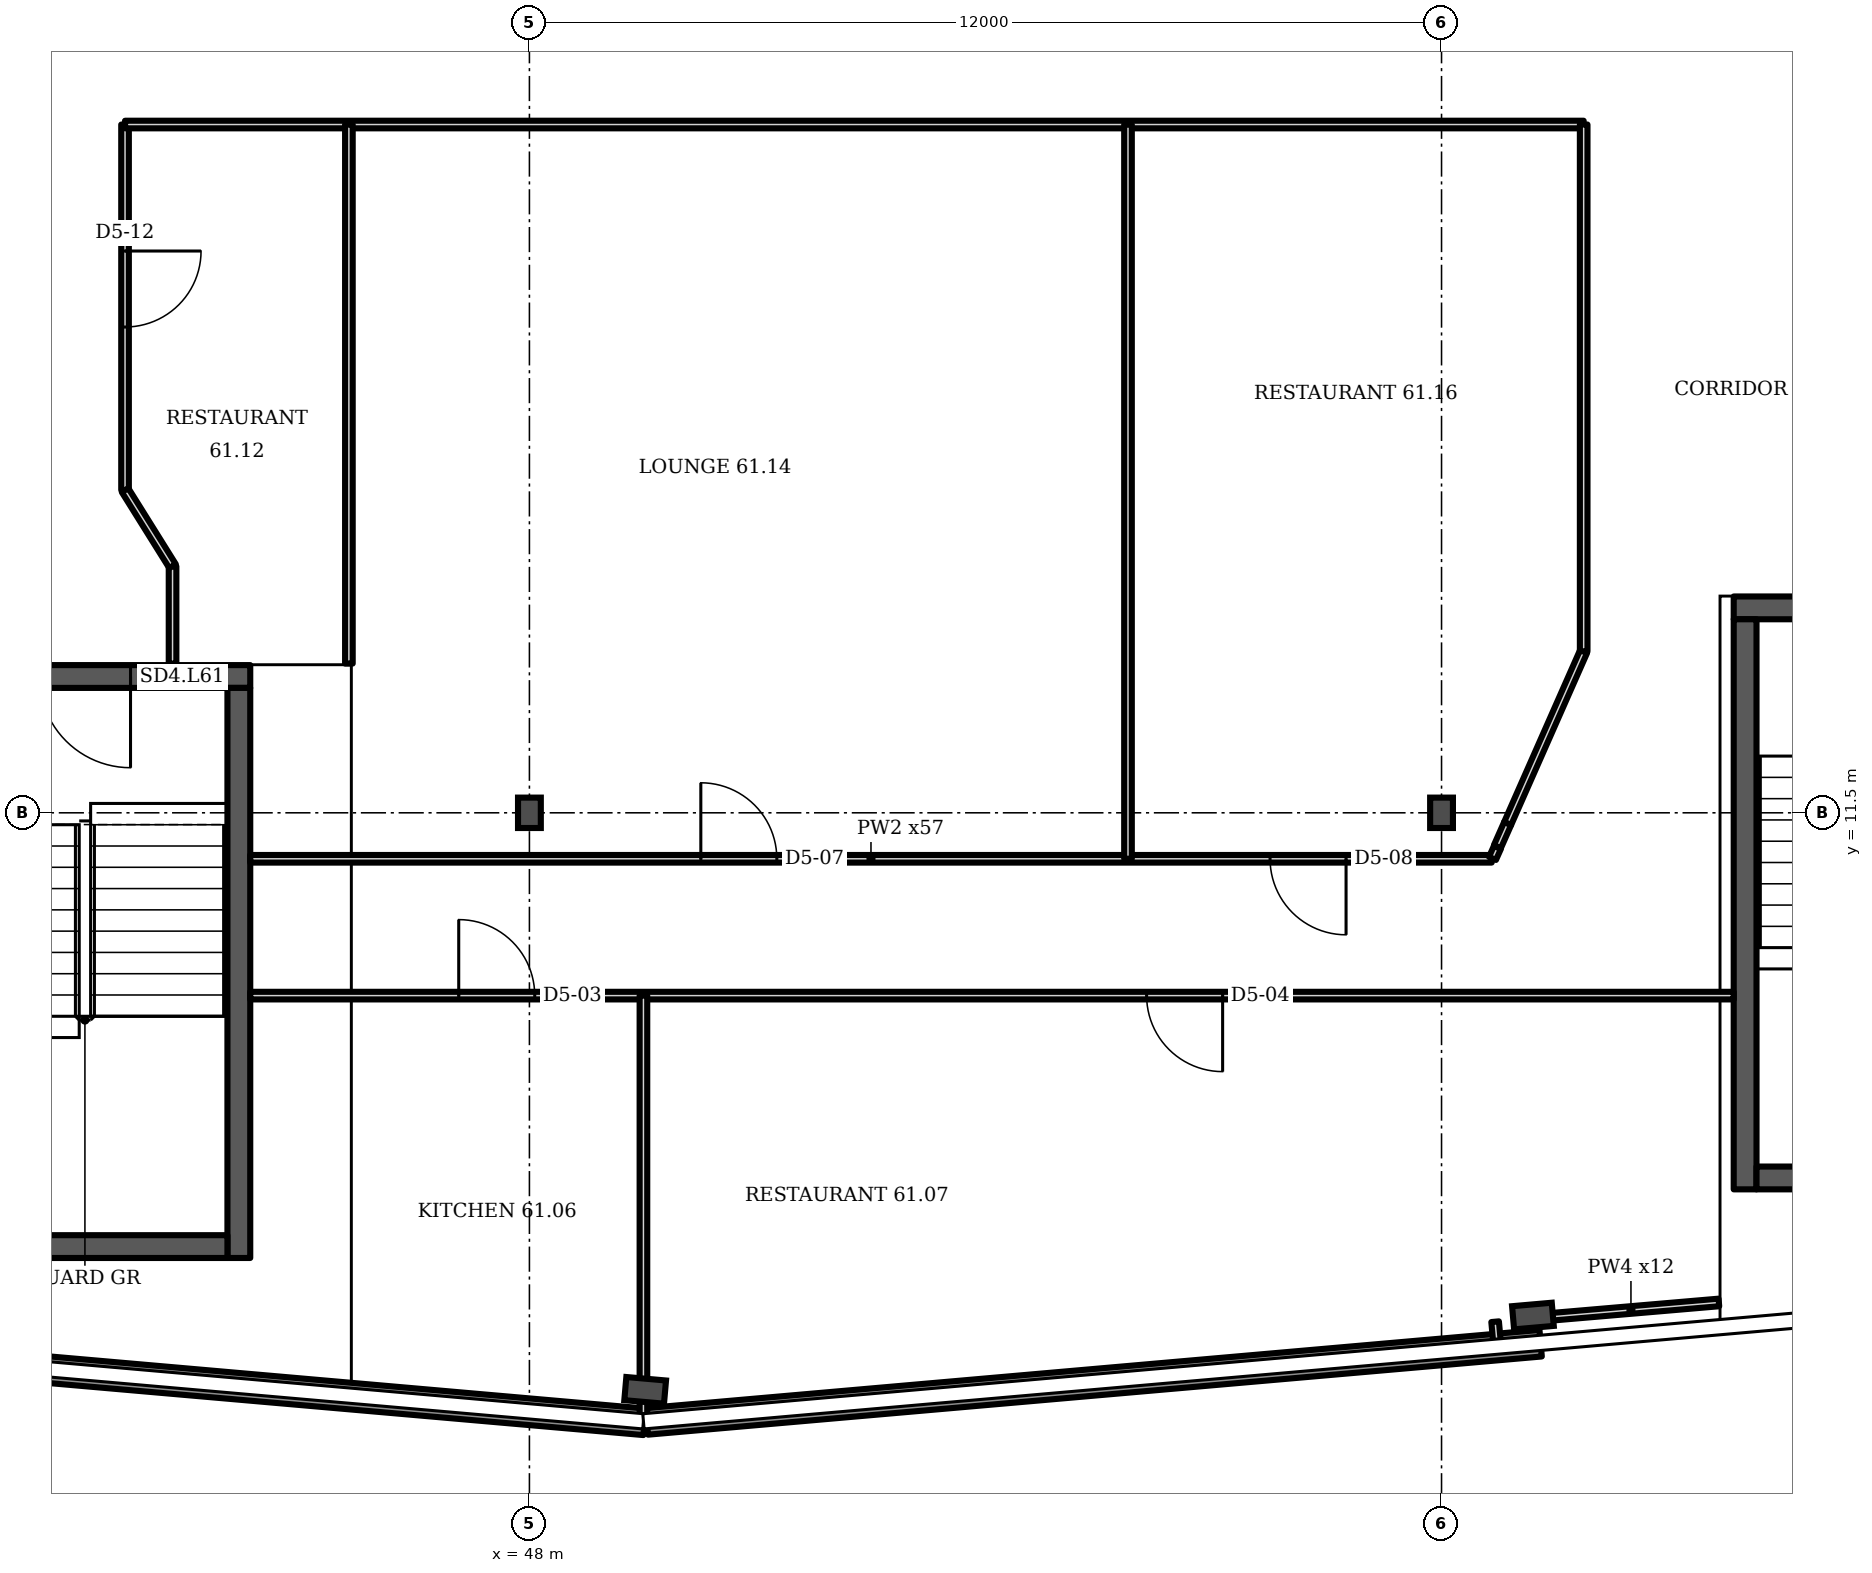
"""IFC4 building model, lengths in metres.
Left out: names, types, materials, properties, quantities, classifications, styles, units other than length and angle.
Written with IfcOpenShell. Run it as: python <this file> out.ifc"""

import sys

from ifc_helpers import new_model, si_unit, direction, frame, frame_2d, origin, origin_2d, place, context, subcontext, project, spatial, rectangle, i_section, extrude, element, fill, save


model = new_model("IFC4")
c1 = context("Model", 3, precision=1e-05, world=origin(), true_north=direction((0.0, 1.0)))
c2 = subcontext(c1, "Body", "Model", "MODEL_VIEW")
j1 = project(units=[si_unit("LENGTHUNIT", "METRE"), si_unit("PLANEANGLEUNIT", "RADIAN")], contexts=[c1])
p1 = place(None, origin())
s1 = spatial("IfcSite", under=j1, at=p1, CompositionType="ELEMENT")
p2 = place(p1, origin())
s2 = spatial("IfcBuilding", under=s1, at=p2, CompositionType="ELEMENT")
p3 = place(p2, frame((0.0, 0.0, 243.1)))
s3 = spatial("IfcBuildingStorey", under=s2, at=p3, CompositionType="ELEMENT", Elevation=243.1)
for number, where, z_axis, x_axis in (
    (1, (49.523, 3.902, 0.0), (0.0, 0.0, 1.0), (-0.087, -0.996, 0.0)),
    (2, (61.202, 4.879, 0.0), (0.0, 0.0, 1.0), (0.087, -0.996, 0.0)),
):
    element("IfcColumn", number, at=place(p3, frame(where, z_axis=z_axis, x_axis=x_axis)), inside=s3, PredefinedType="COLUMN", context=c2, shape_type="SweptSolid", body=[
        extrude(i_section(OverallWidth=0.306, OverallDepth=0.524, WebThickness=0.021, FlangeThickness=0.04, FilletRadius=0.027, at=origin_2d()), origin(), (0.0, 0.0, 1.0), 3.6),
    ])
for number, where, z_axis, x_axis in (
    (3, (48.0, 11.5, 0.0), (0.0, 0.0, 1.0), (1.0, 0.0, 0.0)),
    (4, (60.0, 11.5, 0.0), (0.0, 0.0, 1.0), (1.0, 0.0, 0.0)),
):
    element("IfcColumn", number, at=place(p3, frame(where, z_axis=z_axis, x_axis=x_axis)), inside=s3, PredefinedType="COLUMN", context=c2, shape_type="SweptSolid", body=[
        extrude(i_section(OverallWidth=0.3, OverallDepth=0.4, WebThickness=0.013, FlangeThickness=0.024, FilletRadius=0.027, at=origin_2d()), origin(), (0.0, 0.0, 1.0), 3.6),
    ])
p4 = place(p3, frame((37.729, 4.519, 0.0), z_axis=(0.0, 0.0, 1.0), x_axis=(0.99619, -0.087167, 0.0)))
e5 = element("IfcWall", 5, at=p4, inside=s3, PredefinedType="SOLIDWALL", context=c2, shape_type="SweptSolid", body=[
    extrude(rectangle(XDim=11.831, YDim=0.35, at=frame_2d((5.915, 0.0))), origin(), (0.0, 0.0, 1.0), 1.0),
])
p5 = place(p3, frame((49.545, 3.493, 0.0), z_axis=(0.0, 0.0, 1.0), x_axis=(0.996196, 0.087141, 0.0)))
e6 = element("IfcWall", 6, at=p5, inside=s3, PredefinedType="SOLIDWALL", context=c2, shape_type="SweptSolid", body=[
    extrude(rectangle(XDim=11.803, YDim=0.35, at=frame_2d((5.902, 0.0))), origin(), (0.0, 0.0, 1.0), 1.0),
])
p6 = place(p3, frame((39.977, 13.293, 0.0), z_axis=(0.0, 0.0, 1.0), x_axis=(1.0, 0.0, 0.0)))
e7 = element("IfcWall", 7, at=p6, inside=s3, PredefinedType="SHEAR", context=c2, shape_type="SweptSolid", body=[
    extrude(rectangle(XDim=4.35, YDim=0.3, at=frame_2d((2.175, 0.0))), origin(), (0.0, 0.0, 1.0), 3.2),
])
p7 = place(p6, frame((1.575, 0.0, 0.0)))
e8 = element("IfcOpeningElement", 8, at=p7, cuts=e7, PredefinedType="OPENING", context=c2, shape_type="SweptSolid", body=[
    extrude(rectangle(XDim=1.2, YDim=2.1, at=frame_2d((0.6, 1.05))), frame((0.0, 0.16, 0.0), z_axis=(0.0, -1.0, 0.0), x_axis=(1.0, 0.0, 0.0)), (0.0, 0.0, 1.0), 0.32),
])
p8 = place(p3, frame((63.844, 14.196, 0.0), z_axis=(0.0, 0.0, 1.0), x_axis=(1.0, 0.0, 0.0)))
e9 = element("IfcWall", 9, at=p8, inside=s3, PredefinedType="SHEAR", context=c2, shape_type="SweptSolid", body=[
    extrude(rectangle(XDim=4.35, YDim=0.3, at=frame_2d((2.175, 0.0))), origin(), (0.0, 0.0, 1.0), 3.2),
])
p9 = place(p8, frame((1.575, 0.0, 0.0)))
e10 = element("IfcOpeningElement", 10, at=p9, cuts=e9, PredefinedType="OPENING", context=c2, shape_type="SweptSolid", body=[
    extrude(rectangle(XDim=1.2, YDim=2.1, at=frame_2d((0.6, 1.05))), frame((0.0, 0.16, 0.0), z_axis=(0.0, -1.0, 0.0), x_axis=(1.0, 0.0, 0.0)), (0.0, 0.0, 1.0), 0.32),
])
p10 = place(p3, frame((42.68, 15.745, 0.0), z_axis=(0.0, 0.0, 1.0), x_axis=(0.0, 1.0, 0.0)))
e11 = element("IfcWall", 11, at=p10, inside=s3, PredefinedType="PARTITIONING", context=c2, shape_type="SweptSolid", body=[
    extrude(rectangle(XDim=4.81, YDim=0.1, at=frame_2d((2.405, 0.0))), origin(), (0.0, 0.0, 1.0), 3.2),
])
p11 = place(p10, frame((2.146, 0.0, 0.0)))
e12 = element("IfcOpeningElement", 12, at=p11, cuts=e11, PredefinedType="OPENING", context=c2, shape_type="SweptSolid", body=[
    extrude(rectangle(XDim=1.0, YDim=2.1, at=frame_2d((0.5, 1.05))), frame((0.0, 0.06, 0.0), z_axis=(0.0, -1.0, 0.0), x_axis=(1.0, 0.0, 0.0)), (0.0, 0.0, 1.0), 0.12),
])
p12 = place(p3, frame((42.68, 20.555, 0.0), z_axis=(0.0, 0.0, 1.0), x_axis=(1.0, 0.0, 0.0)))
e13 = element("IfcWall", 13, at=p12, inside=s3, PredefinedType="PARTITIONING", context=c2, shape_type="SweptSolid", body=[
    extrude(rectangle(XDim=19.19, YDim=0.1, at=frame_2d((9.595, 0.0))), origin(), (0.0, 0.0, 1.0), 3.2),
])
p13 = place(p3, frame((43.305, 13.463, 0.0), z_axis=(0.0, 0.0, 1.0), x_axis=(0.0, 1.0, 0.0)))
e14 = element("IfcWall", 14, at=p13, inside=s3, PredefinedType="PARTITIONING", context=c2, shape_type="SweptSolid", body=[
    extrude(rectangle(XDim=1.282, YDim=0.1, at=frame_2d((0.641, 0.0))), origin(), (0.0, 0.0, 1.0), 3.2),
])
p14 = place(p3, frame((43.305, 14.745, 0.0), z_axis=(0.0, 0.0, 1.0), x_axis=(-0.53, 0.848, 0.0)))
e15 = element("IfcWall", 15, at=p14, inside=s3, PredefinedType="PARTITIONING", context=c2, shape_type="SweptSolid", body=[
    extrude(rectangle(XDim=1.179, YDim=0.1, at=frame_2d((0.59, 0.0))), origin(), (0.0, 0.0, 1.0), 3.2),
])
p15 = place(p3, frame((44.327, 9.095, 0.0), z_axis=(0.0, 0.0, 1.0), x_axis=(1.0, 0.0, 0.0)))
e16 = element("IfcWall", 16, at=p15, inside=s3, PredefinedType="PARTITIONING", context=c2, shape_type="SweptSolid", body=[
    extrude(rectangle(XDim=19.517, YDim=0.1, at=frame_2d((9.758, 0.0))), origin(), (0.0, 0.0, 1.0), 3.2),
])
p16 = place(p15, frame((2.743, 0.0, 0.0)))
e17 = element("IfcOpeningElement", 17, at=p16, cuts=e16, PredefinedType="OPENING", context=c2, shape_type="SweptSolid", body=[
    extrude(rectangle(XDim=1.0, YDim=2.1, at=frame_2d((0.5, 1.05))), frame((0.0, 0.06, 0.0), z_axis=(0.0, -1.0, 0.0), x_axis=(1.0, 0.0, 0.0)), (0.0, 0.0, 1.0), 0.12),
])
p17 = place(p15, frame((11.793, 0.0, 0.0)))
e18 = element("IfcOpeningElement", 18, at=p17, cuts=e16, PredefinedType="OPENING", context=c2, shape_type="SweptSolid", body=[
    extrude(rectangle(XDim=1.0, YDim=2.1, at=frame_2d((0.5, 1.05))), frame((0.0, 0.06, 0.0), z_axis=(0.0, -1.0, 0.0), x_axis=(1.0, 0.0, 0.0)), (0.0, 0.0, 1.0), 0.12),
])
p18 = place(p3, frame((44.327, 10.895, 0.0), z_axis=(0.0, 0.0, 1.0), x_axis=(1.0, 0.0, 0.0)))
e19 = element("IfcWall", 19, at=p18, inside=s3, PredefinedType="PARTITIONING", context=c2, shape_type="SweptSolid", body=[
    extrude(rectangle(XDim=16.333, YDim=0.1, at=frame_2d((8.167, 0.0))), origin(), (0.0, 0.0, 1.0), 3.2),
])
p19 = place(p18, frame((5.928, 0.0, 0.0)))
e20 = element("IfcOpeningElement", 20, at=p19, cuts=e19, PredefinedType="OPENING", context=c2, shape_type="SweptSolid", body=[
    extrude(rectangle(XDim=1.0, YDim=2.1, at=frame_2d((0.5, 1.05))), frame((0.0, 0.06, 0.0), z_axis=(0.0, -1.0, 0.0), x_axis=(1.0, 0.0, 0.0)), (0.0, 0.0, 1.0), 0.12),
])
p20 = place(p18, frame((13.417, 0.0, 0.0)))
e21 = element("IfcOpeningElement", 21, at=p20, cuts=e19, PredefinedType="OPENING", context=c2, shape_type="SweptSolid", body=[
    extrude(rectangle(XDim=1.0, YDim=2.1, at=frame_2d((0.5, 1.05))), frame((0.0, 0.06, 0.0), z_axis=(0.0, -1.0, 0.0), x_axis=(1.0, 0.0, 0.0)), (0.0, 0.0, 1.0), 0.12),
])
p21 = place(p3, frame((45.625, 13.463, 0.0), z_axis=(0.0, 0.0, 1.0), x_axis=(0.0, 1.0, 0.0)))
e22 = element("IfcWall", 22, at=p21, inside=s3, PredefinedType="PARTITIONING", context=c2, shape_type="SweptSolid", body=[
    extrude(rectangle(XDim=7.092, YDim=0.1, at=frame_2d((3.546, 0.0))), origin(), (0.0, 0.0, 1.0), 3.2),
])
p22 = place(p3, frame((49.5, 3.514, 0.0), z_axis=(0.0, 0.0, 1.0), x_axis=(0.0, 1.0, 0.0)))
e23 = element("IfcWall", 23, at=p22, inside=s3, PredefinedType="PARTITIONING", context=c2, shape_type="SweptSolid", body=[
    extrude(rectangle(XDim=5.581, YDim=0.1, at=frame_2d((2.791, 0.0))), origin(), (0.0, 0.0, 1.0), 3.2),
])
p23 = place(p3, frame((55.875, 10.895, 0.0), z_axis=(0.0, 0.0, 1.0), x_axis=(0.0, 1.0, 0.0)))
e24 = element("IfcWall", 24, at=p23, inside=s3, PredefinedType="PARTITIONING", context=c2, shape_type="SweptSolid", body=[
    extrude(rectangle(XDim=9.66, YDim=0.1, at=frame_2d((4.83, 0.0))), origin(), (0.0, 0.0, 1.0), 3.2),
])
p24 = place(p3, frame((60.67, 10.9, 0.0), z_axis=(0.0, 0.0, 1.0), x_axis=(0.409983, 0.912097, 0.0)))
e25 = element("IfcWall", 25, at=p24, inside=s3, PredefinedType="PARTITIONING", context=c2, shape_type="SweptSolid", body=[
    extrude(rectangle(XDim=0.159, YDim=0.1, at=frame_2d((0.08, 0.0))), origin(), (0.0, 0.0, 1.0), 3.2),
])
p25 = place(p3, frame((60.733, 4.497, 0.0), z_axis=(0.0, 0.0, 1.0), x_axis=(-0.090037, 0.995936, 0.0)))
e26 = element("IfcWall", 26, at=p25, inside=s3, PredefinedType="PARTITIONING", context=c2, shape_type="SweptSolid", body=[
    extrude(rectangle(XDim=0.309, YDim=0.1, at=frame_2d((0.155, 0.0))), origin(), (0.0, 0.0, 1.0), 3.2),
])
p26 = place(p3, frame((60.735, 11.055, 0.0), z_axis=(0.0, 0.0, 1.0), x_axis=(0.404577, 0.914505, 0.0)))
e27 = element("IfcWall", 27, at=p26, inside=s3, PredefinedType="PARTITIONING", context=c2, shape_type="SweptSolid", body=[
    extrude(rectangle(XDim=0.334, YDim=0.1, at=frame_2d((0.167, 0.0))), origin(), (0.0, 0.0, 1.0), 3.2),
])
p27 = place(p3, frame((60.87, 11.36, 0.0), z_axis=(0.0, 0.0, 1.0), x_axis=(0.403903, 0.914797, 0.0)))
e28 = element("IfcWall", 28, at=p27, inside=s3, PredefinedType="PARTITIONING", context=c2, shape_type="SweptSolid", body=[
    extrude(rectangle(XDim=2.476, YDim=0.1, at=frame_2d((1.238, 0.0))), origin(), (0.0, 0.0, 1.0), 3.2),
])
p28 = place(p3, frame((61.335, 4.86, 0.0), z_axis=(0.0, 0.0, 1.0), x_axis=(0.996359, 0.085264, 0.0)))
e29 = element("IfcWall", 29, at=p28, inside=s3, PredefinedType="PARTITIONING", context=c2, shape_type="SweptSolid", body=[
    extrude(rectangle(XDim=2.322, YDim=0.1, at=frame_2d((1.161, 0.0))), origin(), (0.0, 0.0, 1.0), 2.58),
])
p29 = place(p3, frame((61.87, 13.625, 0.0), z_axis=(0.0, 0.0, 1.0), x_axis=(0.0, 1.0, 0.0)))
e30 = element("IfcWall", 30, at=p29, inside=s3, PredefinedType="PARTITIONING", context=c2, shape_type="SweptSolid", body=[
    extrude(rectangle(XDim=6.93, YDim=0.1, at=frame_2d((3.465, 0.0))), origin(), (0.0, 0.0, 1.0), 3.2),
])
p30 = place(p3, frame((44.177, 5.643, 0.0), z_axis=(0.0, 0.0, 1.0), x_axis=(0.0, 1.0, 0.0)))
e31 = element("IfcWall", 31, at=p30, inside=s3, PredefinedType="SHEAR", context=c2, shape_type="SweptSolid", body=[
    extrude(rectangle(XDim=7.5, YDim=0.3, at=frame_2d((3.75, 0.0))), origin(), (0.0, 0.0, 1.0), 3.2),
])
p31 = place(p3, frame((40.277, 5.793, 0.0), z_axis=(0.0, 0.0, 1.0), x_axis=(1.0, 0.0, 0.0)))
e32 = element("IfcWall", 32, at=p31, inside=s3, PredefinedType="SHEAR", context=c2, shape_type="SweptSolid", body=[
    extrude(rectangle(XDim=3.75, YDim=0.3, at=frame_2d((1.875, 0.0))), origin(), (0.0, 0.0, 1.0), 3.2),
])
p32 = place(p3, frame((63.994, 6.546, 0.0), z_axis=(0.0, 0.0, 1.0), x_axis=(0.0, 1.0, 0.0)))
e33 = element("IfcWall", 33, at=p32, inside=s3, PredefinedType="SHEAR", context=c2, shape_type="SweptSolid", body=[
    extrude(rectangle(XDim=7.5, YDim=0.3, at=frame_2d((3.75, 0.0))), origin(), (0.0, 0.0, 1.0), 3.2),
])
p33 = place(p3, frame((64.144, 6.696, 0.0), z_axis=(0.0, 0.0, 1.0), x_axis=(1.0, 0.0, 0.0)))
e34 = element("IfcWall", 34, at=p33, inside=s3, PredefinedType="SHEAR", context=c2, shape_type="SweptSolid", body=[
    extrude(rectangle(XDim=3.75, YDim=0.3, at=frame_2d((1.875, 0.0))), origin(), (0.0, 0.0, 1.0), 3.2),
])
p34 = place(p7, origin())
e35 = element("IfcDoor", 35, at=p34, inside=s3, OperationType="SINGLE_SWING_RIGHT", PredefinedType="DOOR", context=c2, shape_type="SweptSolid", body=[
    extrude(rectangle(XDim=1.2, YDim=2.1, at=frame_2d((0.6, 1.05))), frame((0.0, 0.025, 0.0), z_axis=(0.0, -1.0, 0.0), x_axis=(1.0, 0.0, 0.0)), (0.0, 0.0, 1.0), 0.05),
])
fill(e8, e35)
p35 = place(p16, origin())
e36 = element("IfcDoor", 36, at=p35, inside=s3, OperationType="SINGLE_SWING_LEFT", PredefinedType="DOOR", context=c2, shape_type="SweptSolid", body=[
    extrude(rectangle(XDim=1.0, YDim=2.1, at=frame_2d((0.5, 1.05))), frame((0.0, 0.025, 0.0), z_axis=(0.0, -1.0, 0.0), x_axis=(1.0, 0.0, 0.0)), (0.0, 0.0, 1.0), 0.05),
])
fill(e17, e36)
p36 = place(p17, origin())
e37 = element("IfcDoor", 37, at=p36, inside=s3, OperationType="SINGLE_SWING_RIGHT", PredefinedType="DOOR", context=c2, shape_type="SweptSolid", body=[
    extrude(rectangle(XDim=1.0, YDim=2.1, at=frame_2d((0.5, 1.05))), frame((0.0, 0.025, 0.0), z_axis=(0.0, -1.0, 0.0), x_axis=(1.0, 0.0, 0.0)), (0.0, 0.0, 1.0), 0.05),
])
fill(e18, e37)
p37 = place(p19, origin())
e38 = element("IfcDoor", 38, at=p37, inside=s3, OperationType="SINGLE_SWING_LEFT", PredefinedType="DOOR", context=c2, shape_type="SweptSolid", body=[
    extrude(rectangle(XDim=1.0, YDim=2.1, at=frame_2d((0.5, 1.05))), frame((0.0, 0.025, 0.0), z_axis=(0.0, -1.0, 0.0), x_axis=(1.0, 0.0, 0.0)), (0.0, 0.0, 1.0), 0.05),
])
fill(e20, e38)
p38 = place(p20, origin())
e39 = element("IfcDoor", 39, at=p38, inside=s3, OperationType="SINGLE_SWING_RIGHT", PredefinedType="DOOR", context=c2, shape_type="SweptSolid", body=[
    extrude(rectangle(XDim=1.0, YDim=2.1, at=frame_2d((0.5, 1.05))), frame((0.0, 0.025, 0.0), z_axis=(0.0, -1.0, 0.0), x_axis=(1.0, 0.0, 0.0)), (0.0, 0.0, 1.0), 0.05),
])
fill(e21, e39)
p39 = place(p11, origin())
e40 = element("IfcDoor", 40, at=p39, inside=s3, OperationType="SINGLE_SWING_RIGHT", PredefinedType="DOOR", context=c2, shape_type="SweptSolid", body=[
    extrude(rectangle(XDim=1.0, YDim=2.1, at=frame_2d((0.5, 1.05))), frame((0.0, 0.025, 0.0), z_axis=(0.0, -1.0, 0.0), x_axis=(1.0, 0.0, 0.0)), (0.0, 0.0, 1.0), 0.05),
])
fill(e12, e40)
save(model, sys.argv[1])
